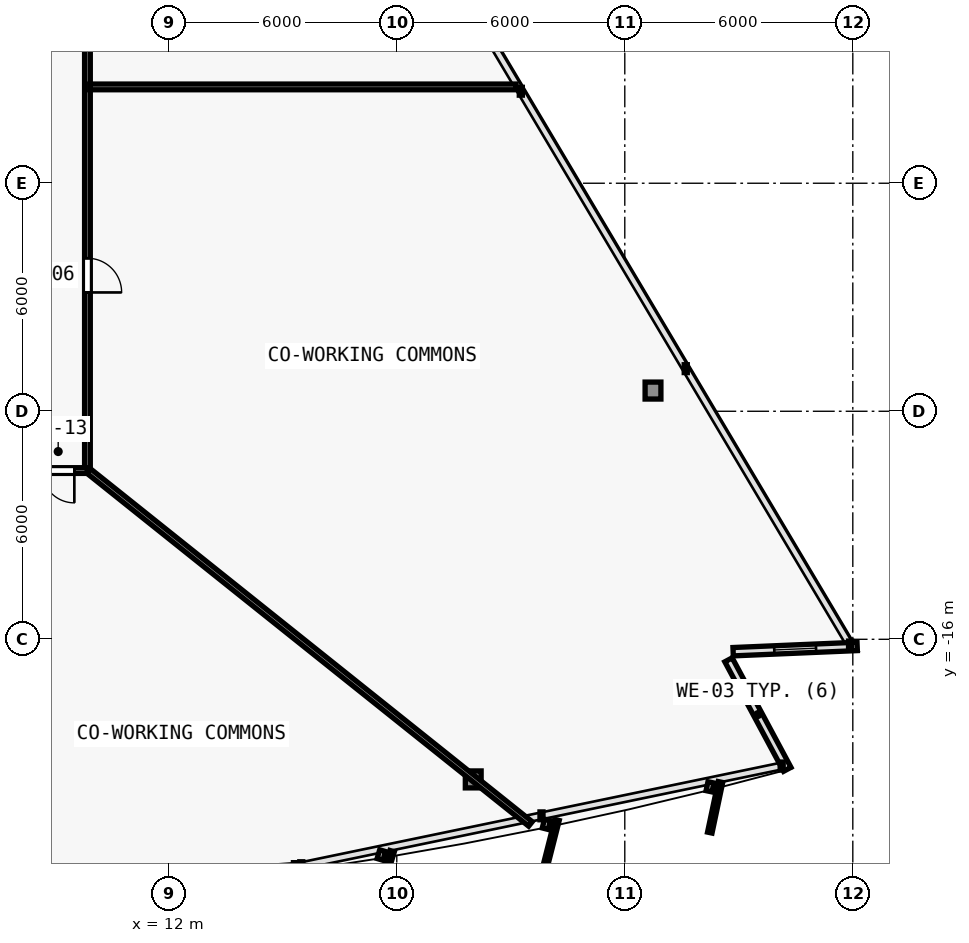
"""IFC4 building model, lengths in metres.
Left out: names, types, materials, properties, quantities, classifications, styles, units other than length and angle.
Written with IfcOpenShell. Run it as: python <this file> out.ifc"""

import sys

from ifc_helpers import new_model, si_unit, direction, frame, frame_2d, origin, origin_2d, place, context, subcontext, project, spatial, rectangle, i_section, extrude, element, fill, save


model = new_model("IFC4")
c1 = context("Model", 3, precision=1e-05, world=origin(), true_north=direction((0.0, 1.0)))
c2 = subcontext(c1, "Body", "Model", "MODEL_VIEW")
j1 = project(units=[si_unit("LENGTHUNIT", "METRE"), si_unit("PLANEANGLEUNIT", "RADIAN")], contexts=[c1])
p1 = place(None, origin())
s1 = spatial("IfcSite", under=j1, at=p1, CompositionType="ELEMENT")
p2 = place(p1, origin())
s2 = spatial("IfcBuilding", under=s1, at=p2, CompositionType="ELEMENT")
p3 = place(p2, frame((0.0, 0.0, 44.4)))
s3 = spatial("IfcBuildingStorey", under=s2, at=p3, CompositionType="ELEMENT", Elevation=44.4)
p4 = place(p3, frame((20.012, -19.687, 0.006), z_axis=(-0.020596245868, 0.03357935795, 0.999223809452), x_axis=(-0.852427604955, -0.522845271865, 0.0)))
e1 = element("IfcColumn", 1, at=p4, inside=s3, PredefinedType="COLUMN", context=c2, shape_type="SweptSolid", body=[
    extrude(i_section(OverallWidth=0.416, OverallDepth=0.446, WebThickness=0.025, FlangeThickness=0.04, FilletRadius=0.015, at=origin_2d()), origin(), (0.0, 0.0, 1.0), 3.592),
])
p5 = place(p3, frame((24.742, -9.455, 0.006), z_axis=(-0.026039494941, 0.021620259507, 0.999427090428), x_axis=(-0.638800249892, -0.769372628015, 0.0)))
e2 = element("IfcColumn", 2, at=p5, inside=s3, PredefinedType="COLUMN", context=c2, shape_type="SweptSolid", body=[
    extrude(i_section(OverallWidth=0.416, OverallDepth=0.446, WebThickness=0.025, FlangeThickness=0.04, FilletRadius=0.015, at=origin_2d()), origin(), (0.0, 0.0, 1.0), 3.591),
])
p6 = place(p3, frame((26.729, -16.54, 0.0), z_axis=(0.0, 0.0, 1.0), x_axis=(0.472830429959, -0.881153439819, 0.0)))
e3 = element("IfcWall", 3, at=p6, inside=s3, PredefinedType="SOLIDWALL", context=c2, shape_type="SweptSolid", body=[
    extrude(rectangle(XDim=3.27, YDim=0.22, at=frame_2d((1.635, 0.0))), origin(), (0.0, 0.0, 1.0), 3.35),
])
p7 = place(p3, frame((30.115, -16.188, 0.0), z_axis=(0.0, 0.0, 1.0), x_axis=(-0.999095638069, -0.042519477791, 0.0)))
e4 = element("IfcWall", 4, at=p7, inside=s3, PredefinedType="SOLIDWALL", context=c2, shape_type="SweptSolid", body=[
    extrude(rectangle(XDim=3.267, YDim=0.22, at=frame_2d((1.634, 0.0))), origin(), (0.0, 0.0, 1.0), 3.35),
])
p8 = place(p7, frame((1.083, 0.0, 0.62)))
e5 = element("IfcOpeningElement", 5, at=p8, cuts=e4, PredefinedType="OPENING", context=c2, shape_type="SweptSolid", body=[
    extrude(rectangle(XDim=1.1, YDim=1.8, at=frame_2d((0.55, 0.9))), frame((0.0, 0.12, 0.0), z_axis=(0.0, -1.0, 0.0), x_axis=(1.0, 0.0, 0.0)), (0.0, 0.0, 1.0), 0.24),
])
p9 = place(p3, frame((9.86, 8.426, 0.0), z_axis=(0.0, 0.0, 1.0), x_axis=(0.0, -1.0, 0.0)))
e6 = element("IfcWall", 6, at=p9, inside=s3, PredefinedType="PARTITIONING", context=c2, shape_type="SweptSolid", body=[
    extrude(rectangle(XDim=19.986, YDim=0.15, at=frame_2d((9.993, 0.0))), origin(), (0.0, 0.0, 1.0), 2.609),
])
p10 = place(p9, frame((14.399, 0.0, 0.0)))
e7 = element("IfcOpeningElement", 7, at=p10, cuts=e6, PredefinedType="OPENING", context=c2, shape_type="SweptSolid", body=[
    extrude(rectangle(XDim=0.9, YDim=2.1, at=frame_2d((0.45, 1.05))), frame((0.0, 0.085, 0.0), z_axis=(0.0, -1.0, 0.0), x_axis=(1.0, 0.0, 0.0)), (0.0, 0.0, 1.0), 0.17),
])
p11 = place(p3, frame((9.86, -11.56, 0.0), z_axis=(0.0, 0.0, 1.0), x_axis=(-1.0, 0.0, 0.0)))
e8 = element("IfcWall", 8, at=p11, inside=s3, PredefinedType="PARTITIONING", context=c2, shape_type="SweptSolid", body=[
    extrude(rectangle(XDim=6.78, YDim=0.15, at=frame_2d((3.39, 0.0))), origin(), (0.0, 0.0, 1.0), 2.609),
])
p12 = place(p11, frame((3.556, 0.0, 0.0)))
e9 = element("IfcOpeningElement", 9, at=p12, cuts=e8, PredefinedType="OPENING", context=c2, shape_type="SweptSolid", body=[
    extrude(rectangle(XDim=0.9, YDim=2.1, at=frame_2d((0.45, 1.05))), frame((0.0, 0.085, 0.0), z_axis=(0.0, -1.0, 0.0), x_axis=(1.0, 0.0, 0.0)), (0.0, 0.0, 1.0), 0.17),
])
p13 = place(p11, frame((0.344, 0.0, 0.0)))
e10 = element("IfcOpeningElement", 10, at=p13, cuts=e8, PredefinedType="OPENING", context=c2, shape_type="SweptSolid", body=[
    extrude(rectangle(XDim=0.85, YDim=2.1, at=frame_2d((0.425, 1.05))), frame((0.0, 0.085, 0.0), z_axis=(0.0, -1.0, 0.0), x_axis=(1.0, 0.0, 0.0)), (0.0, 0.0, 1.0), 0.17),
])
p14 = place(p3, frame((9.888, -11.569, 0.0), z_axis=(0.0, 0.0, 1.0), x_axis=(0.781299107074, -0.624156795433, 0.0)))
e11 = element("IfcWall", 11, at=p14, inside=s3, PredefinedType="PARTITIONING", context=c2, shape_type="SweptSolid", body=[
    extrude(rectangle(XDim=14.884, YDim=0.15, at=frame_2d((7.442, 0.0))), origin(), (0.0, 0.0, 1.0), 2.609),
])
p15 = place(p3, frame((9.92, -1.465, 0.0), z_axis=(0.0, 0.0, 1.0), x_axis=(1.0, 0.0, 0.0)))
e12 = element("IfcWall", 12, at=p15, inside=s3, PredefinedType="PARTITIONING", context=c2, shape_type="SweptSolid", body=[
    extrude(rectangle(XDim=11.218, YDim=0.15, at=frame_2d((5.609, 0.0))), origin(), (0.0, 0.0, 1.0), 2.735),
])
p16 = place(p8, origin())
e13 = element("IfcWindow", 13, at=p16, inside=s3, PartitioningType="SINGLE_PANEL", PredefinedType="WINDOW", context=c2, shape_type="SweptSolid", body=[
    extrude(rectangle(XDim=1.1, YDim=1.8, at=frame_2d((0.55, 0.9))), frame((0.0, 0.03, 0.0), z_axis=(0.0, -1.0, 0.0), x_axis=(1.0, 0.0, 0.0)), (0.0, 0.0, 1.0), 0.06),
])
fill(e5, e13)
p17 = place(p13, origin())
e14 = element("IfcDoor", 14, at=p17, inside=s3, OperationType="SINGLE_SWING_LEFT", PredefinedType="DOOR", context=c2, shape_type="SweptSolid", body=[
    extrude(rectangle(XDim=0.85, YDim=2.1, at=frame_2d((0.425, 1.05))), frame((0.0, 0.025, 0.0), z_axis=(0.0, -1.0, 0.0), x_axis=(1.0, 0.0, 0.0)), (0.0, 0.0, 1.0), 0.05),
])
fill(e10, e14)
p18 = place(p10, origin())
e15 = element("IfcDoor", 15, at=p18, inside=s3, OperationType="SINGLE_SWING_RIGHT", PredefinedType="DOOR", context=c2, shape_type="SweptSolid", body=[
    extrude(rectangle(XDim=0.9, YDim=2.1, at=frame_2d((0.45, 1.05))), frame((0.0, 0.025, 0.0), z_axis=(0.0, -1.0, 0.0), x_axis=(1.0, 0.0, 0.0)), (0.0, 0.0, 1.0), 0.05),
])
fill(e7, e15)
save(model, sys.argv[1])
